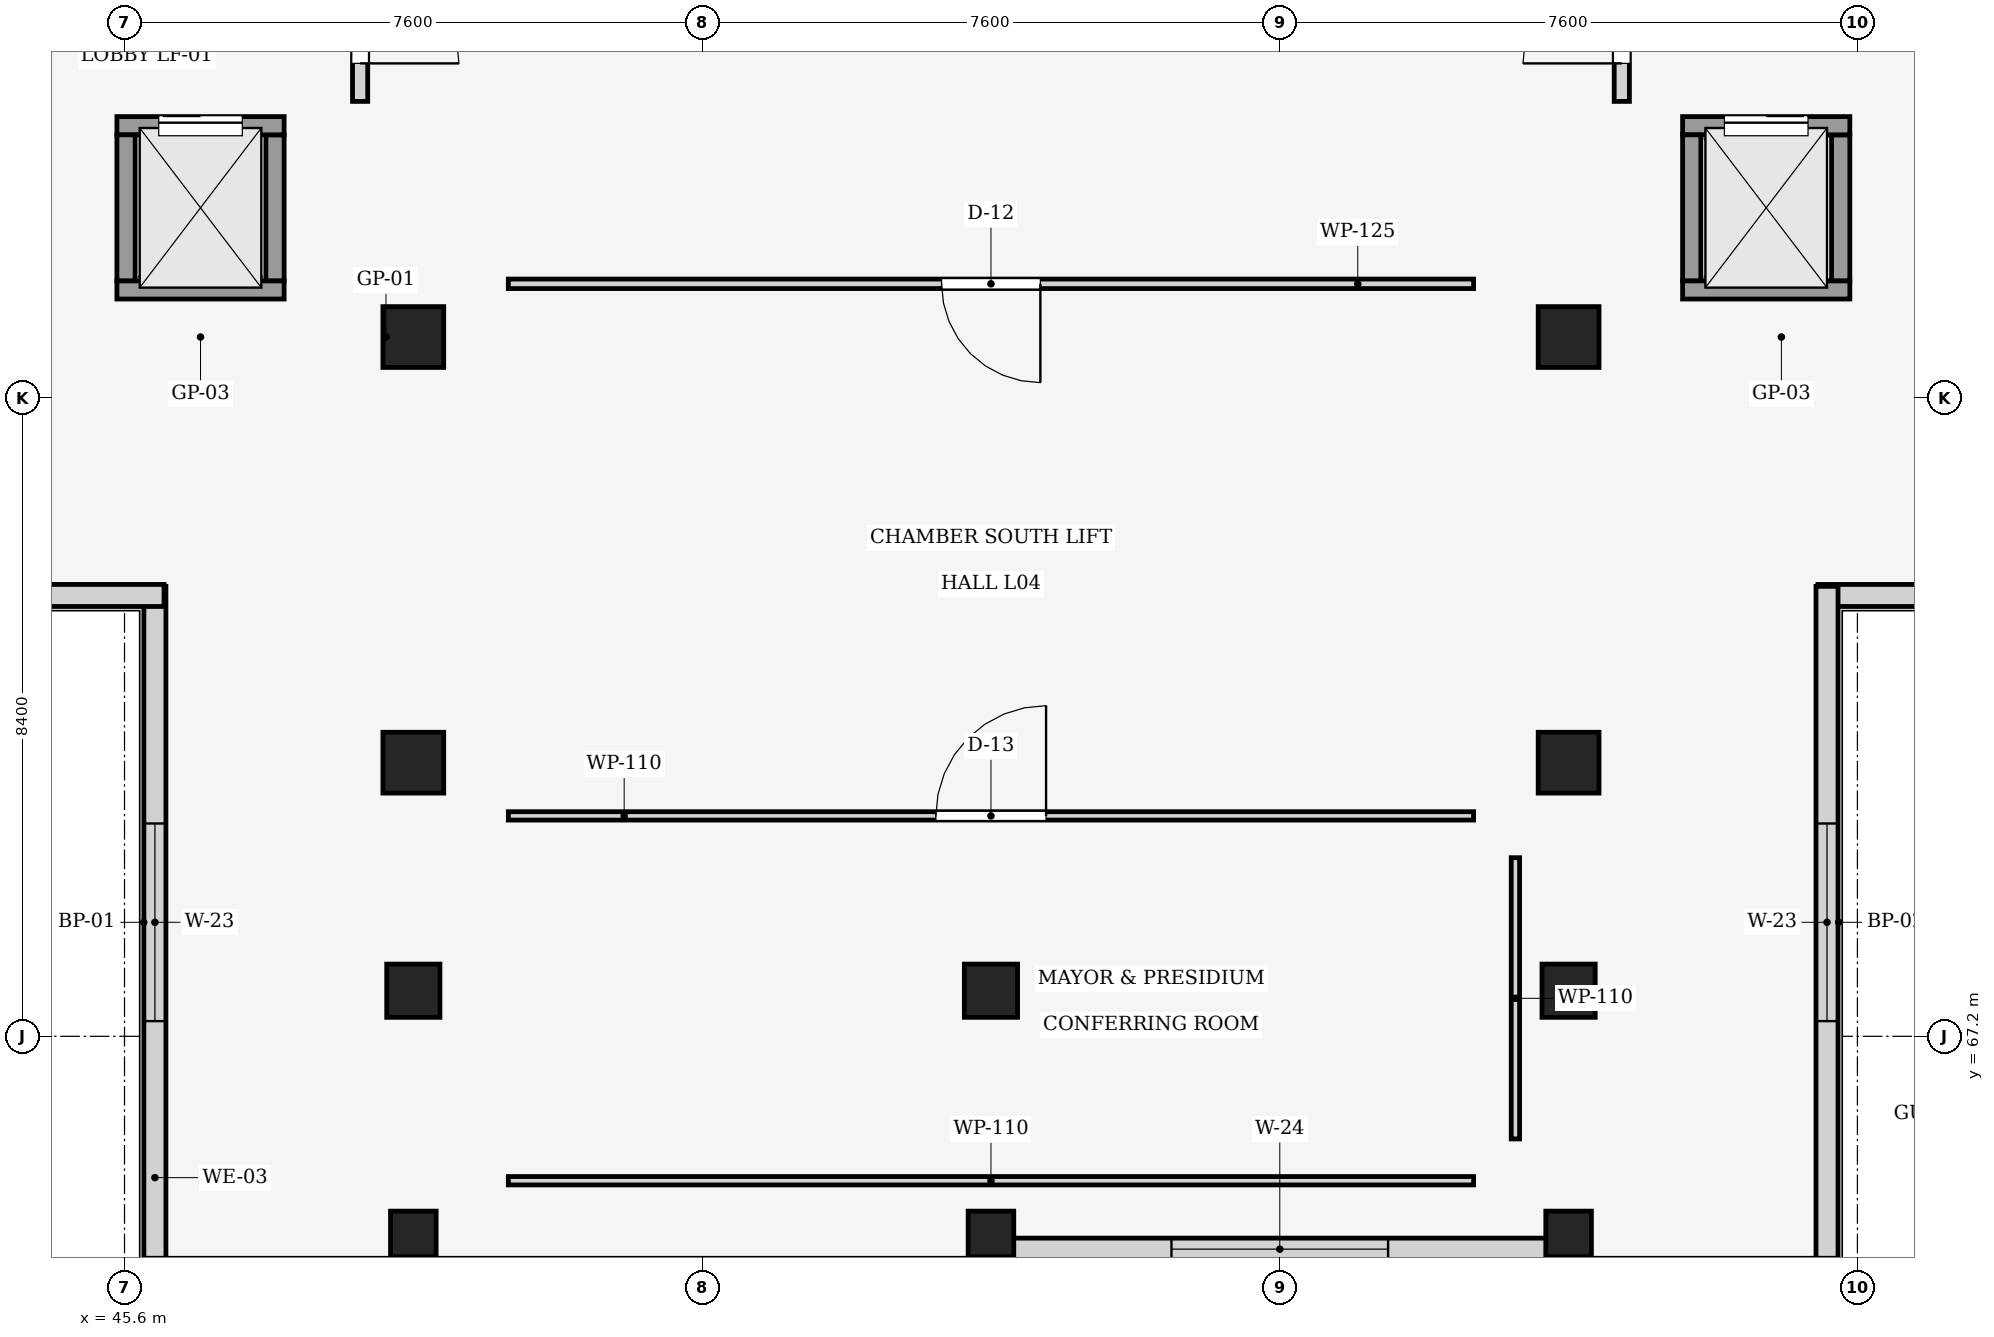
"""IFC4 building model, lengths in metres.
Left out: names, types, materials, properties, quantities, classifications, styles, units other than length and angle.
Written with IfcOpenShell. Run it as: python <this file> out.ifc"""

import sys

from ifc_helpers import new_model, si_unit, direction, frame, frame_2d, origin, origin_2d, place, context, subcontext, project, spatial, rectangle, extrude, element, fill, save


model = new_model("IFC4")
c1 = context("Model", 3, precision=1e-05, world=origin(), true_north=direction((0.0, 1.0)))
c2 = subcontext(c1, "Body", "Model", "MODEL_VIEW")
j1 = project(units=[si_unit("LENGTHUNIT", "METRE"), si_unit("PLANEANGLEUNIT", "RADIAN")], contexts=[c1])
p1 = place(None, origin())
s1 = spatial("IfcSite", under=j1, at=p1, CompositionType="ELEMENT")
p2 = place(p1, origin())
s2 = spatial("IfcBuilding", under=s1, at=p2, CompositionType="ELEMENT")
p3 = place(p2, frame((0.0, 0.0, 17.25)))
s3 = spatial("IfcBuildingStorey", under=s2, at=p3, CompositionType="ELEMENT", Elevation=17.25)
for number, where, z_axis, x_axis in (
    (1, (49.4, 70.8, 0.0), (0.0, 0.0, 1.0), (1.0, 0.0, 0.0)),
    (2, (49.4, 76.4, 0.0), (0.0, 0.0, 1.0), (1.0, 0.0, 0.0)),
    (3, (64.6, 70.8, 0.0), (0.0, 0.0, 1.0), (1.0, 0.0, 0.0)),
    (4, (64.6, 76.4, 0.0), (0.0, 0.0, 1.0), (1.0, 0.0, 0.0)),
):
    element("IfcColumn", number, at=place(p3, frame(where, z_axis=z_axis, x_axis=x_axis)), inside=s3, PredefinedType="COLUMN", context=c2, shape_type="SweptSolid", body=[
        extrude(rectangle(XDim=0.8, YDim=0.8, at=origin_2d()), origin(), (0.0, 0.0, 1.0), 4.05),
    ])
for number, where, z_axis, x_axis in (
    (5, (49.4, 67.8, 0.0), (0.0, 0.0, 1.0), (1.0, 0.0, 0.0)),
    (6, (57.0, 67.8, 0.0), (0.0, 0.0, 1.0), (1.0, 0.0, 0.0)),
    (7, (64.6, 67.8, 0.0), (0.0, 0.0, 1.0), (1.0, 0.0, 0.0)),
):
    element("IfcColumn", number, at=place(p3, frame(where, z_axis=z_axis, x_axis=x_axis)), inside=s3, PredefinedType="COLUMN", context=c2, shape_type="SweptSolid", body=[
        extrude(rectangle(XDim=0.7, YDim=0.7, at=origin_2d()), origin(), (0.0, 0.0, 1.0), 4.05),
    ])
for number, where, z_axis, x_axis in (
    (8, (49.4, 64.6, -0.28), (0.0, 0.0, 1.0), (1.0, 0.0, 0.0)),
    (9, (57.0, 64.6, -0.28), (0.0, 0.0, 1.0), (1.0, 0.0, 0.0)),
    (10, (64.6, 64.6, -0.28), (0.0, 0.0, 1.0), (1.0, 0.0, 0.0)),
):
    element("IfcColumn", number, at=place(p3, frame(where, z_axis=z_axis, x_axis=x_axis)), inside=s3, PredefinedType="COLUMN", context=c2, shape_type="SweptSolid", body=[
        extrude(rectangle(XDim=0.6, YDim=0.6, at=origin_2d()), origin(), (0.0, 0.0, 1.0), 4.33),
    ])
p4 = place(p3, frame((46.0, 64.28, 0.0), z_axis=(0.0, 0.0, 1.0), x_axis=(0.0, 1.0, 0.0)))
e11 = element("IfcWall", 11, at=p4, inside=s3, PredefinedType="STANDARD", context=c2, shape_type="SweptSolid", body=[
    extrude(rectangle(XDim=8.84, YDim=0.29, at=frame_2d((4.42, 0.0))), origin(), (0.0, 0.0, 1.0), 2.935),
])
p5 = place(p4, frame((3.12, 0.0, 0.85)))
e12 = element("IfcOpeningElement", 12, at=p5, cuts=e11, PredefinedType="OPENING", context=c2, shape_type="SweptSolid", body=[
    extrude(rectangle(XDim=2.6, YDim=1.65, at=frame_2d((1.3, 0.825))), frame((0.0, 0.155, 0.0), z_axis=(0.0, -1.0, 0.0), x_axis=(1.0, 0.0, 0.0)), (0.0, 0.0, 1.0), 0.31),
])
p6 = place(p3, frame((46.12, 73.0, 0.0), z_axis=(0.0, 0.0, 1.0), x_axis=(-1.0, 0.0, 0.0)))
e13 = element("IfcWall", 13, at=p6, inside=s3, PredefinedType="STANDARD", context=c2, shape_type="SweptSolid", body=[
    extrude(rectangle(XDim=8.84, YDim=0.29, at=frame_2d((4.42, 0.0))), origin(), (0.0, 0.0, 1.0), 2.935),
])
p7 = place(p6, frame((2.995, 0.0, 0.85)))
e14 = element("IfcOpeningElement", 14, at=p7, cuts=e13, PredefinedType="OPENING", context=c2, shape_type="SweptSolid", body=[
    extrude(rectangle(XDim=2.85, YDim=1.65, at=frame_2d((1.425, 0.825))), frame((0.0, 0.155, 0.0), z_axis=(0.0, -1.0, 0.0), x_axis=(1.0, 0.0, 0.0)), (0.0, 0.0, 1.0), 0.31),
])
p8 = place(p3, frame((76.72, 73.0, 0.0), z_axis=(0.0, 0.0, 1.0), x_axis=(-1.0, 0.0, 0.0)))
e15 = element("IfcWall", 15, at=p8, inside=s3, PredefinedType="STANDARD", context=c2, shape_type="SweptSolid", body=[
    extrude(rectangle(XDim=8.84, YDim=0.29, at=frame_2d((4.42, 0.0))), origin(), (0.0, 0.0, 1.0), 2.935),
])
p9 = place(p8, frame((3.245, 0.0, 0.85)))
e16 = element("IfcOpeningElement", 16, at=p9, cuts=e15, PredefinedType="OPENING", context=c2, shape_type="SweptSolid", body=[
    extrude(rectangle(XDim=2.35, YDim=1.65, at=frame_2d((1.175, 0.825))), frame((0.0, 0.155, 0.0), z_axis=(0.0, -1.0, 0.0), x_axis=(1.0, 0.0, 0.0)), (0.0, 0.0, 1.0), 0.31),
])
p10 = place(p3, frame((68.0, 73.12, 0.0), z_axis=(0.0, 0.0, 1.0), x_axis=(0.0, -1.0, 0.0)))
e17 = element("IfcWall", 17, at=p10, inside=s3, PredefinedType="STANDARD", context=c2, shape_type="SweptSolid", body=[
    extrude(rectangle(XDim=8.84, YDim=0.29, at=frame_2d((4.42, 0.0))), origin(), (0.0, 0.0, 1.0), 2.935),
])
p11 = place(p10, frame((3.12, 0.0, 0.85)))
e18 = element("IfcOpeningElement", 18, at=p11, cuts=e17, PredefinedType="OPENING", context=c2, shape_type="SweptSolid", body=[
    extrude(rectangle(XDim=2.6, YDim=1.65, at=frame_2d((1.3, 0.825))), frame((0.0, 0.155, 0.0), z_axis=(0.0, -1.0, 0.0), x_axis=(1.0, 0.0, 0.0)), (0.0, 0.0, 1.0), 0.31),
])
p12 = place(p3, frame((64.365, 64.4, 0.0), z_axis=(0.0, 0.0, 1.0), x_axis=(-1.0, 0.0, 0.0)))
e19 = element("IfcWall", 19, at=p12, inside=s3, PredefinedType="STANDARD", context=c2, shape_type="SweptSolid", body=[
    extrude(rectangle(XDim=7.13, YDim=0.29, at=frame_2d((3.565, 0.0))), origin(), (0.0, 0.0, 1.0), 3.085),
])
p13 = place(p12, frame((2.14, 0.0, 0.85)))
e20 = element("IfcOpeningElement", 20, at=p13, cuts=e19, PredefinedType="OPENING", context=c2, shape_type="SweptSolid", body=[
    extrude(rectangle(XDim=2.85, YDim=1.65, at=frame_2d((1.425, 0.825))), frame((0.0, 0.155, 0.0), z_axis=(0.0, -1.0, 0.0), x_axis=(1.0, 0.0, 0.0)), (0.0, 0.0, 1.0), 0.31),
])
p14 = place(p3, frame((47.7, 77.02, 0.0), z_axis=(0.0, 0.0, 1.0), x_axis=(-1.0, 0.0, 0.0)))
e21 = element("IfcWall", 21, at=p14, inside=s3, PredefinedType="SHEAR", context=c2, shape_type="SweptSolid", body=[
    extrude(rectangle(XDim=2.2, YDim=0.24, at=frame_2d((1.1, 0.0))), origin(), (0.0, 0.0, 1.0), 4.05),
])
p15 = place(p3, frame((47.58, 79.06, 0.0), z_axis=(0.0, 0.0, 1.0), x_axis=(0.0, -1.0, 0.0)))
e22 = element("IfcWall", 22, at=p15, inside=s3, PredefinedType="SHEAR", context=c2, shape_type="SweptSolid", body=[
    extrude(rectangle(XDim=1.92, YDim=0.24, at=frame_2d((0.96, 0.0))), origin(), (0.0, 0.0, 1.0), 4.05),
])
p16 = place(p3, frame((45.5, 79.18, 0.0), z_axis=(0.0, 0.0, 1.0), x_axis=(1.0, 0.0, 0.0)))
e23 = element("IfcWall", 23, at=p16, inside=s3, PredefinedType="SHEAR", context=c2, shape_type="SweptSolid", body=[
    extrude(rectangle(XDim=2.2, YDim=0.24, at=frame_2d((1.1, 0.0))), origin(), (0.0, 0.0, 1.0), 4.05),
])
p17 = place(p16, frame((0.55, 0.0, 0.0)))
e24 = element("IfcOpeningElement", 24, at=p17, cuts=e23, PredefinedType="OPENING", context=c2, shape_type="SweptSolid", body=[
    extrude(rectangle(XDim=1.1, YDim=2.15, at=frame_2d((0.55, 1.075))), frame((0.0, 0.13, 0.0), z_axis=(0.0, -1.0, 0.0), x_axis=(1.0, 0.0, 0.0)), (0.0, 0.0, 1.0), 0.26),
])
p18 = place(p3, frame((45.62, 77.14, 0.0), z_axis=(0.0, 0.0, 1.0), x_axis=(0.0, 1.0, 0.0)))
e25 = element("IfcWall", 25, at=p18, inside=s3, PredefinedType="SHEAR", context=c2, shape_type="SweptSolid", body=[
    extrude(rectangle(XDim=1.92, YDim=0.24, at=frame_2d((0.96, 0.0))), origin(), (0.0, 0.0, 1.0), 4.05),
])
p19 = place(p3, frame((48.7, 81.8, 0.0), z_axis=(0.0, 0.0, 1.0), x_axis=(0.0, -1.0, 0.0)))
e26 = element("IfcWall", 26, at=p19, inside=s3, PredefinedType="PARTITIONING", context=c2, shape_type="SweptSolid", body=[
    extrude(rectangle(XDim=2.3, YDim=0.2, at=frame_2d((1.15, 0.0))), origin(), (0.0, 0.0, 1.0), 2.9),
])
p20 = place(p19, frame((0.5, 0.0, 0.0)))
e27 = element("IfcOpeningElement", 27, at=p20, cuts=e26, PredefinedType="OPENING", context=c2, shape_type="SweptSolid", body=[
    extrude(rectangle(XDim=1.3, YDim=2.2, at=frame_2d((0.65, 1.1))), frame((0.0, 0.11, 0.0), z_axis=(0.0, -1.0, 0.0), x_axis=(1.0, 0.0, 0.0)), (0.0, 0.0, 1.0), 0.22),
])
p21 = place(p3, frame((68.3, 77.02, 0.0), z_axis=(0.0, 0.0, 1.0), x_axis=(-1.0, 0.0, 0.0)))
e28 = element("IfcWall", 28, at=p21, inside=s3, PredefinedType="SHEAR", context=c2, shape_type="SweptSolid", body=[
    extrude(rectangle(XDim=2.2, YDim=0.24, at=frame_2d((1.1, 0.0))), origin(), (0.0, 0.0, 1.0), 4.05),
])
p22 = place(p3, frame((68.18, 79.06, 0.0), z_axis=(0.0, 0.0, 1.0), x_axis=(0.0, -1.0, 0.0)))
e29 = element("IfcWall", 29, at=p22, inside=s3, PredefinedType="SHEAR", context=c2, shape_type="SweptSolid", body=[
    extrude(rectangle(XDim=1.92, YDim=0.24, at=frame_2d((0.96, 0.0))), origin(), (0.0, 0.0, 1.0), 4.05),
])
p23 = place(p3, frame((66.1, 79.18, 0.0), z_axis=(0.0, 0.0, 1.0), x_axis=(1.0, 0.0, 0.0)))
e30 = element("IfcWall", 30, at=p23, inside=s3, PredefinedType="SHEAR", context=c2, shape_type="SweptSolid", body=[
    extrude(rectangle(XDim=2.2, YDim=0.24, at=frame_2d((1.1, 0.0))), origin(), (0.0, 0.0, 1.0), 4.05),
])
p24 = place(p23, frame((0.55, 0.0, 0.0)))
e31 = element("IfcOpeningElement", 31, at=p24, cuts=e30, PredefinedType="OPENING", context=c2, shape_type="SweptSolid", body=[
    extrude(rectangle(XDim=1.1, YDim=2.15, at=frame_2d((0.55, 1.075))), frame((0.0, 0.13, 0.0), z_axis=(0.0, -1.0, 0.0), x_axis=(1.0, 0.0, 0.0)), (0.0, 0.0, 1.0), 0.26),
])
p25 = place(p3, frame((66.22, 77.14, 0.0), z_axis=(0.0, 0.0, 1.0), x_axis=(0.0, 1.0, 0.0)))
e32 = element("IfcWall", 32, at=p25, inside=s3, PredefinedType="SHEAR", context=c2, shape_type="SweptSolid", body=[
    extrude(rectangle(XDim=1.92, YDim=0.24, at=frame_2d((0.96, 0.0))), origin(), (0.0, 0.0, 1.0), 4.05),
])
p26 = place(p3, frame((65.3, 79.5, 0.0), z_axis=(0.0, 0.0, 1.0), x_axis=(0.0, 1.0, 0.0)))
e33 = element("IfcWall", 33, at=p26, inside=s3, PredefinedType="PARTITIONING", context=c2, shape_type="SweptSolid", body=[
    extrude(rectangle(XDim=2.3, YDim=0.2, at=frame_2d((1.15, 0.0))), origin(), (0.0, 0.0, 1.0), 2.9),
])
p27 = place(p26, frame((0.5, 0.0, 0.0)))
e34 = element("IfcOpeningElement", 34, at=p27, cuts=e33, PredefinedType="OPENING", context=c2, shape_type="SweptSolid", body=[
    extrude(rectangle(XDim=1.3, YDim=2.2, at=frame_2d((0.65, 1.1))), frame((0.0, 0.11, 0.0), z_axis=(0.0, -1.0, 0.0), x_axis=(1.0, 0.0, 0.0)), (0.0, 0.0, 1.0), 0.22),
])
p28 = place(p3, frame((63.35, 77.1, 0.0), z_axis=(0.0, 0.0, 1.0), x_axis=(-1.0, 0.0, 0.0)))
e35 = element("IfcWall", 35, at=p28, inside=s3, PredefinedType="PARTITIONING", context=c2, shape_type="SweptSolid", body=[
    extrude(rectangle(XDim=12.7, YDim=0.125, at=frame_2d((6.35, 0.0))), origin(), (0.0, 0.0, 1.0), 3.285),
])
p29 = place(p28, frame((5.7, 0.0, 0.0)))
e36 = element("IfcOpeningElement", 36, at=p29, cuts=e35, PredefinedType="OPENING", context=c2, shape_type="SweptSolid", body=[
    extrude(rectangle(XDim=1.3, YDim=2.22, at=frame_2d((0.65, 1.11))), frame((0.0, 0.073, 0.0), z_axis=(0.0, -1.0, 0.0), x_axis=(1.0, 0.0, 0.0)), (0.0, 0.0, 1.0), 0.145),
])
p30 = place(p3, frame((50.65, 70.1, 0.0), z_axis=(0.0, 0.0, 1.0), x_axis=(1.0, 0.0, 0.0)))
e37 = element("IfcWall", 37, at=p30, inside=s3, PredefinedType="PARTITIONING", context=c2, shape_type="SweptSolid", body=[
    extrude(rectangle(XDim=12.7, YDim=0.11, at=frame_2d((6.35, 0.0))), origin(), (0.0, 0.0, 1.0), 3.62),
])
p31 = place(p30, frame((5.625, 0.0, 0.0)))
e38 = element("IfcOpeningElement", 38, at=p31, cuts=e37, PredefinedType="OPENING", context=c2, shape_type="SweptSolid", body=[
    extrude(rectangle(XDim=1.45, YDim=2.22, at=frame_2d((0.725, 1.11))), frame((0.0, 0.065, 0.0), z_axis=(0.0, -1.0, 0.0), x_axis=(1.0, 0.0, 0.0)), (0.0, 0.0, 1.0), 0.13),
])
p32 = place(p3, frame((63.35, 65.3, 0.0), z_axis=(0.0, 0.0, 1.0), x_axis=(-1.0, 0.0, 0.0)))
e39 = element("IfcWall", 39, at=p32, inside=s3, PredefinedType="PARTITIONING", context=c2, shape_type="SweptSolid", body=[
    extrude(rectangle(XDim=12.7, YDim=0.11, at=frame_2d((6.35, 0.0))), origin(), (0.0, 0.0, 1.0), 3.62),
])
p33 = place(p3, frame((63.9, 69.55, 0.0), z_axis=(0.0, 0.0, 1.0), x_axis=(0.0, -1.0, 0.0)))
e40 = element("IfcWall", 40, at=p33, inside=s3, PredefinedType="PARTITIONING", context=c2, shape_type="SweptSolid", body=[
    extrude(rectangle(XDim=3.7, YDim=0.11, at=frame_2d((1.85, 0.0))), origin(), (0.0, 0.0, 1.0), 3.085),
])
p34 = place(p5, origin())
e41 = element("IfcWindow", 41, at=p34, inside=s3, PartitioningType="SINGLE_PANEL", PredefinedType="WINDOW", context=c2, shape_type="SweptSolid", body=[
    extrude(rectangle(XDim=2.6, YDim=1.65, at=frame_2d((1.3, 0.825))), frame((0.0, 0.03, 0.0), z_axis=(0.0, -1.0, 0.0), x_axis=(1.0, 0.0, 0.0)), (0.0, 0.0, 1.0), 0.06),
])
fill(e12, e41)
p35 = place(p11, origin())
e42 = element("IfcWindow", 42, at=p35, inside=s3, PartitioningType="SINGLE_PANEL", PredefinedType="WINDOW", context=c2, shape_type="SweptSolid", body=[
    extrude(rectangle(XDim=2.6, YDim=1.65, at=frame_2d((1.3, 0.825))), frame((0.0, 0.03, 0.0), z_axis=(0.0, -1.0, 0.0), x_axis=(1.0, 0.0, 0.0)), (0.0, 0.0, 1.0), 0.06),
])
fill(e18, e42)
p36 = place(p13, origin())
e43 = element("IfcWindow", 43, at=p36, inside=s3, PartitioningType="SINGLE_PANEL", PredefinedType="WINDOW", context=c2, shape_type="SweptSolid", body=[
    extrude(rectangle(XDim=2.85, YDim=1.65, at=frame_2d((1.425, 0.825))), frame((0.0, 0.03, 0.0), z_axis=(0.0, -1.0, 0.0), x_axis=(1.0, 0.0, 0.0)), (0.0, 0.0, 1.0), 0.06),
])
fill(e20, e43)
p37 = place(p17, origin())
e44 = element("IfcDoor", 44, at=p37, inside=s3, OperationType="SLIDING_TO_LEFT", PredefinedType="DOOR", context=c2, shape_type="SweptSolid", body=[
    extrude(rectangle(XDim=1.1, YDim=2.15, at=frame_2d((0.55, 1.075))), frame((0.0, 0.025, 0.0), z_axis=(0.0, -1.0, 0.0), x_axis=(1.0, 0.0, 0.0)), (0.0, 0.0, 1.0), 0.05),
])
fill(e24, e44)
p38 = place(p20, origin())
e45 = element("IfcDoor", 45, at=p38, inside=s3, OperationType="SINGLE_SWING_RIGHT", PredefinedType="DOOR", context=c2, shape_type="SweptSolid", body=[
    extrude(rectangle(XDim=1.3, YDim=2.2, at=frame_2d((0.65, 1.1))), frame((0.0, 0.025, 0.0), z_axis=(0.0, -1.0, 0.0), x_axis=(1.0, 0.0, 0.0)), (0.0, 0.0, 1.0), 0.05),
])
fill(e27, e45)
p39 = place(p24, origin())
e46 = element("IfcDoor", 46, at=p39, inside=s3, OperationType="SLIDING_TO_RIGHT", PredefinedType="DOOR", context=c2, shape_type="SweptSolid", body=[
    extrude(rectangle(XDim=1.1, YDim=2.15, at=frame_2d((0.55, 1.075))), frame((0.0, 0.025, 0.0), z_axis=(0.0, -1.0, 0.0), x_axis=(1.0, 0.0, 0.0)), (0.0, 0.0, 1.0), 0.05),
])
fill(e31, e46)
p40 = place(p27, origin())
e47 = element("IfcDoor", 47, at=p40, inside=s3, OperationType="SINGLE_SWING_LEFT", PredefinedType="DOOR", context=c2, shape_type="SweptSolid", body=[
    extrude(rectangle(XDim=1.3, YDim=2.2, at=frame_2d((0.65, 1.1))), frame((0.0, 0.025, 0.0), z_axis=(0.0, -1.0, 0.0), x_axis=(1.0, 0.0, 0.0)), (0.0, 0.0, 1.0), 0.05),
])
fill(e34, e47)
p41 = place(p29, origin())
e48 = element("IfcDoor", 48, at=p41, inside=s3, OperationType="SINGLE_SWING_LEFT", PredefinedType="DOOR", context=c2, shape_type="SweptSolid", body=[
    extrude(rectangle(XDim=1.3, YDim=2.22, at=frame_2d((0.65, 1.11))), frame((0.0, 0.025, 0.0), z_axis=(0.0, -1.0, 0.0), x_axis=(1.0, 0.0, 0.0)), (0.0, 0.0, 1.0), 0.05),
])
fill(e36, e48)
p42 = place(p31, origin())
e49 = element("IfcDoor", 49, at=p42, inside=s3, OperationType="SINGLE_SWING_RIGHT", PredefinedType="DOOR", context=c2, shape_type="SweptSolid", body=[
    extrude(rectangle(XDim=1.45, YDim=2.22, at=frame_2d((0.725, 1.11))), frame((0.0, 0.025, 0.0), z_axis=(0.0, -1.0, 0.0), x_axis=(1.0, 0.0, 0.0)), (0.0, 0.0, 1.0), 0.05),
])
fill(e38, e49)
save(model, sys.argv[1])
